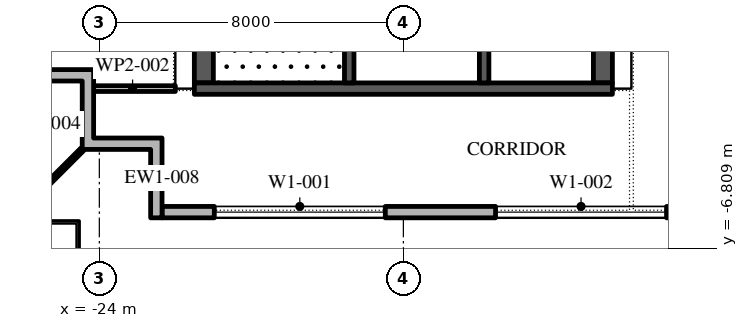
"""IFC4 building model, lengths in metres.
Left out: names, types, materials, properties, quantities, classifications, styles, units other than length and angle.
Written with IfcOpenShell. Run it as: python <this file> out.ifc"""

import sys

from ifc_helpers import new_model, si_unit, direction, frame, frame_2d, origin, place, context, subcontext, project, spatial, polyline, rectangle, outline, extrude, element, fill, save


model = new_model("IFC4")
c1 = context("Model", 3, precision=1e-05, world=origin(), true_north=direction((0.0, 1.0)))
c2 = subcontext(c1, "Body", "Model", "MODEL_VIEW")
j1 = project(units=[si_unit("LENGTHUNIT", "METRE"), si_unit("PLANEANGLEUNIT", "RADIAN")], contexts=[c1])
p1 = place(None, origin())
s1 = spatial("IfcSite", under=j1, at=p1, CompositionType="ELEMENT")
p2 = place(p1, origin())
s2 = spatial("IfcBuilding", under=s1, at=p2, CompositionType="ELEMENT")
p3 = place(p2, frame((0.0, 0.0, 342.6)))
s3 = spatial("IfcBuildingStorey", under=s2, at=p3, CompositionType="ELEMENT", Elevation=342.6)
p4 = place(p3, frame((-22.35, -5.85, 0.0), z_axis=(0.0, 0.0, 1.0), x_axis=(1.0, 0.0, 0.0)))
e1 = element("IfcWall", 1, at=p4, inside=s3, PredefinedType="STANDARD", context=c2, shape_type="SweptSolid", body=[
    extrude(rectangle(XDim=45.0, YDim=0.3, at=frame_2d((22.5, 0.0))), origin(), (0.0, 0.0, 1.0), 4.0),
])
p5 = place(p4, frame((1.375, 0.0, 0.45)))
e2 = element("IfcOpeningElement", 2, at=p5, cuts=e1, PredefinedType="OPENING", context=c2, shape_type="SweptSolid", body=[
    extrude(rectangle(XDim=4.5, YDim=3.05, at=frame_2d((2.25, 1.525))), frame((0.0, 0.16, 0.0), z_axis=(0.0, -1.0, 0.0), x_axis=(1.0, 0.0, 0.0)), (0.0, 0.0, 1.0), 0.32),
])
p6 = place(p4, frame((8.775, 0.0, 0.45)))
e3 = element("IfcOpeningElement", 3, at=p6, cuts=e1, PredefinedType="OPENING", context=c2, shape_type="SweptSolid", body=[
    extrude(rectangle(XDim=4.5, YDim=3.05, at=frame_2d((2.25, 1.525))), frame((0.0, 0.16, 0.0), z_axis=(0.0, -1.0, 0.0), x_axis=(1.0, 0.0, 0.0)), (0.0, 0.0, 1.0), 0.32),
])
p7 = place(p4, frame((17.375, 0.0, 0.0)))
e4 = element("IfcOpeningElement", 4, at=p7, cuts=e1, PredefinedType="OPENING", context=c2, shape_type="SweptSolid", body=[
    extrude(rectangle(XDim=2.4, YDim=3.5, at=frame_2d((1.2, 1.75))), frame((0.0, 0.16, 0.0), z_axis=(0.0, -1.0, 0.0), x_axis=(1.0, 0.0, 0.0)), (0.0, 0.0, 1.0), 0.32),
])
p8 = place(p4, frame((23.875, 0.0, 0.45)))
e5 = element("IfcOpeningElement", 5, at=p8, cuts=e1, PredefinedType="OPENING", context=c2, shape_type="SweptSolid", body=[
    extrude(rectangle(XDim=4.5, YDim=3.05, at=frame_2d((2.25, 1.525))), frame((0.0, 0.16, 0.0), z_axis=(0.0, -1.0, 0.0), x_axis=(1.0, 0.0, 0.0)), (0.0, 0.0, 1.0), 0.32),
])
p9 = place(p4, frame((31.425, 0.0, 0.45)))
e6 = element("IfcOpeningElement", 6, at=p9, cuts=e1, PredefinedType="OPENING", context=c2, shape_type="SweptSolid", body=[
    extrude(rectangle(XDim=4.5, YDim=3.05, at=frame_2d((2.25, 1.525))), frame((0.0, 0.16, 0.0), z_axis=(0.0, -1.0, 0.0), x_axis=(1.0, 0.0, 0.0)), (0.0, 0.0, 1.0), 0.32),
])
p10 = place(p4, frame((38.975, 0.0, 0.45)))
e7 = element("IfcOpeningElement", 7, at=p10, cuts=e1, PredefinedType="OPENING", context=c2, shape_type="SweptSolid", body=[
    extrude(rectangle(XDim=4.5, YDim=3.05, at=frame_2d((2.25, 1.525))), frame((0.0, 0.16, 0.0), z_axis=(0.0, -1.0, 0.0), x_axis=(1.0, 0.0, 0.0)), (0.0, 0.0, 1.0), 0.32),
])
p11 = place(p3, origin())
e8 = element("IfcWall", 8, at=p11, inside=s3, PredefinedType="STANDARD", context=c2, shape_type="SweptSolid", body=[
    extrude(outline(polyline([(-22.65, -4.2), (-24.45, -4.2), (-24.45, -2.4), (-25.95, -2.4), (-25.95, -2.1), (-24.15, -2.1), (-24.15, -3.9), (-22.35, -3.9), (-22.35, -6.0), (-22.65, -6.0), (-22.65, -4.2)])), origin(), (0.0, 0.0, 1.0), 4.0),
])
p12 = place(p3, frame((-24.45, -4.2, -0.05), z_axis=(0.0, 0.0, 1.0), x_axis=(-0.707106781187, -0.707106781187, 0.0)))
e9 = element("IfcWall", 9, at=p12, inside=s3, PredefinedType="STANDARD", context=c2, shape_type="SweptSolid", body=[
    extrude(rectangle(XDim=2.667, YDim=0.1, at=frame_2d((1.333, 0.0))), origin(), (0.0, 0.0, 1.0), 4.05),
])
p13 = place(p3, frame((-21.25, -2.45, 0.0), z_axis=(0.0, 0.0, 1.0), x_axis=(0.0, 1.0, 0.0)))
e10 = element("IfcWall", 10, at=p13, inside=s3, PredefinedType="SHEAR", context=c2, shape_type="SweptSolid", body=[
    extrude(rectangle(XDim=27.9, YDim=0.5, at=frame_2d((13.95, 0.0))), origin(), (0.0, 0.0, 1.0), 4.0),
])
p14 = place(p13, frame((5.05, 0.0, 0.0)))
e11 = element("IfcOpeningElement", 11, at=p14, cuts=e10, PredefinedType="OPENING", context=c2, shape_type="SweptSolid", body=[
    extrude(rectangle(XDim=1.2, YDim=2.1, at=frame_2d((0.6, 1.05))), frame((0.0, 0.26, 0.0), z_axis=(0.0, -1.0, 0.0), x_axis=(1.0, 0.0, 0.0)), (0.0, 0.0, 1.0), 0.52),
])
p15 = place(p13, frame((21.65, 0.0, 0.0)))
e12 = element("IfcOpeningElement", 12, at=p15, cuts=e10, PredefinedType="OPENING", context=c2, shape_type="SweptSolid", body=[
    extrude(rectangle(XDim=1.2, YDim=2.1, at=frame_2d((0.6, 1.05))), frame((0.0, 0.26, 0.0), z_axis=(0.0, -1.0, 0.0), x_axis=(1.0, 0.0, 0.0)), (0.0, 0.0, 1.0), 0.52),
])
p16 = place(p3, frame((-10.75, -2.45, 0.0), z_axis=(0.0, 0.0, 1.0), x_axis=(0.0, 1.0, 0.0)))
e13 = element("IfcWall", 13, at=p16, inside=s3, PredefinedType="SHEAR", context=c2, shape_type="SweptSolid", body=[
    extrude(rectangle(XDim=27.9, YDim=0.5, at=frame_2d((13.95, 0.0))), origin(), (0.0, 0.0, 1.0), 4.0),
])
p17 = place(p16, frame((23.65, 0.0, 0.0)))
e14 = element("IfcOpeningElement", 14, at=p17, cuts=e13, PredefinedType="OPENING", context=c2, shape_type="SweptSolid", body=[
    extrude(rectangle(XDim=2.4, YDim=2.1, at=frame_2d((1.2, 1.05))), frame((0.0, 0.26, 0.0), z_axis=(0.0, -1.0, 0.0), x_axis=(1.0, 0.0, 0.0)), (0.0, 0.0, 1.0), 0.52),
])
p18 = place(p16, frame((1.087, 0.0, 0.0)))
e15 = element("IfcOpeningElement", 15, at=p18, cuts=e13, PredefinedType="OPENING", context=c2, shape_type="SweptSolid", body=[
    extrude(rectangle(XDim=0.9, YDim=2.1, at=frame_2d((0.45, 1.05))), frame((0.0, 0.26, 0.0), z_axis=(0.0, -1.0, 0.0), x_axis=(1.0, 0.0, 0.0)), (0.0, 0.0, 1.0), 0.52),
])
p19 = place(p16, frame((4.262, 0.0, 0.0)))
e16 = element("IfcOpeningElement", 16, at=p19, cuts=e13, PredefinedType="OPENING", context=c2, shape_type="SweptSolid", body=[
    extrude(rectangle(XDim=1.0, YDim=2.1, at=frame_2d((0.5, 1.05))), frame((0.0, 0.26, 0.0), z_axis=(0.0, -1.0, 0.0), x_axis=(1.0, 0.0, 0.0)), (0.0, 0.0, 1.0), 0.52),
])
p20 = place(p3, frame((-21.5, -2.6, 0.0), z_axis=(0.0, 0.0, 1.0), x_axis=(1.0, 0.0, 0.0)))
e17 = element("IfcWall", 17, at=p20, inside=s3, PredefinedType="SHEAR", context=c2, shape_type="SweptSolid", body=[
    extrude(rectangle(XDim=11.0, YDim=0.3, at=frame_2d((5.5, 0.0))), origin(), (0.0, 0.0, 1.0), 4.0),
])
p21 = place(p3, frame((-17.425, -2.45, 0.0), z_axis=(0.0, 0.0, 1.0), x_axis=(0.0, 1.0, 0.0)))
e18 = element("IfcWall", 18, at=p21, inside=s3, PredefinedType="SHEAR", context=c2, shape_type="SweptSolid", body=[
    extrude(rectangle(XDim=6.3, YDim=0.25, at=frame_2d((3.15, 0.0))), origin(), (0.0, 0.0, 1.0), 4.0),
])
p22 = place(p21, frame((5.05, 0.0, 0.0)))
e19 = element("IfcOpeningElement", 19, at=p22, cuts=e18, PredefinedType="OPENING", context=c2, shape_type="SweptSolid", body=[
    extrude(rectangle(XDim=1.2, YDim=2.1, at=frame_2d((0.6, 1.05))), frame((0.0, 0.135, 0.0), z_axis=(0.0, -1.0, 0.0), x_axis=(1.0, 0.0, 0.0)), (0.0, 0.0, 1.0), 0.27),
])
p23 = place(p3, frame((-13.875, -2.45, 0.0), z_axis=(0.0, 0.0, 1.0), x_axis=(0.0, 1.0, 0.0)))
e20 = element("IfcWall", 20, at=p23, inside=s3, PredefinedType="SHEAR", context=c2, shape_type="SweptSolid", body=[
    extrude(rectangle(XDim=21.3, YDim=0.25, at=frame_2d((10.65, 0.0))), origin(), (0.0, 0.0, 1.0), 4.0),
])
p24 = place(p23, frame((11.357, 0.0, 0.0)))
e21 = element("IfcOpeningElement", 21, at=p24, cuts=e20, PredefinedType="OPENING", context=c2, shape_type="SweptSolid", body=[
    extrude(rectangle(XDim=0.9, YDim=2.1, at=frame_2d((0.45, 1.05))), frame((0.0, 0.135, 0.0), z_axis=(0.0, -1.0, 0.0), x_axis=(1.0, 0.0, 0.0)), (0.0, 0.0, 1.0), 0.27),
])
p25 = place(p23, frame((6.971, 0.0, 0.0)))
e22 = element("IfcOpeningElement", 22, at=p25, cuts=e20, PredefinedType="OPENING", context=c2, shape_type="SweptSolid", body=[
    extrude(rectangle(XDim=1.1, YDim=2.1, at=frame_2d((0.55, 1.05))), frame((0.0, 0.135, 0.0), z_axis=(0.0, -1.0, 0.0), x_axis=(1.0, 0.0, 0.0)), (0.0, 0.0, 1.0), 0.27),
])
p26 = place(p23, frame((15.543, 0.0, 0.0)))
e23 = element("IfcOpeningElement", 23, at=p26, cuts=e20, PredefinedType="OPENING", context=c2, shape_type="SweptSolid", body=[
    extrude(rectangle(XDim=1.1, YDim=2.1, at=frame_2d((0.55, 1.05))), frame((0.0, 0.135, 0.0), z_axis=(0.0, -1.0, 0.0), x_axis=(1.0, 0.0, 0.0)), (0.0, 0.0, 1.0), 0.27),
])
p27 = place(p23, frame((17.686, 0.0, 0.0)))
e24 = element("IfcOpeningElement", 24, at=p27, cuts=e20, PredefinedType="OPENING", context=c2, shape_type="SweptSolid", body=[
    extrude(rectangle(XDim=1.1, YDim=2.1, at=frame_2d((0.55, 1.05))), frame((0.0, 0.135, 0.0), z_axis=(0.0, -1.0, 0.0), x_axis=(1.0, 0.0, 0.0)), (0.0, 0.0, 1.0), 0.27),
])
p28 = place(p23, frame((19.829, 0.0, 0.0)))
e25 = element("IfcOpeningElement", 25, at=p28, cuts=e20, PredefinedType="OPENING", context=c2, shape_type="SweptSolid", body=[
    extrude(rectangle(XDim=1.1, YDim=2.1, at=frame_2d((0.55, 1.05))), frame((0.0, 0.135, 0.0), z_axis=(0.0, -1.0, 0.0), x_axis=(1.0, 0.0, 0.0)), (0.0, 0.0, 1.0), 0.27),
])
p29 = place(p3, frame((-24.25, -2.6, 0.0), z_axis=(0.0, 0.0, 1.0), x_axis=(1.0, 0.0, 0.0)))
e26 = element("IfcWall", 26, at=p29, inside=s3, PredefinedType="PARTITIONING", context=c2, shape_type="SweptSolid", body=[
    extrude(rectangle(XDim=2.25, YDim=0.15, at=frame_2d((1.125, 0.0))), origin(), (0.0, 0.0, 1.0), 4.0),
])
p30 = place(p5, origin())
e27 = element("IfcWindow", 27, at=p30, inside=s3, PartitioningType="DOUBLE_PANEL_VERTICAL", PredefinedType="WINDOW", context=c2, shape_type="SweptSolid", body=[
    extrude(rectangle(XDim=4.5, YDim=3.05, at=frame_2d((2.25, 1.525))), frame((0.0, 0.03, 0.0), z_axis=(0.0, -1.0, 0.0), x_axis=(1.0, 0.0, 0.0)), (0.0, 0.0, 1.0), 0.06),
])
fill(e2, e27)
p31 = place(p6, origin())
e28 = element("IfcWindow", 28, at=p31, inside=s3, PartitioningType="DOUBLE_PANEL_VERTICAL", PredefinedType="WINDOW", context=c2, shape_type="SweptSolid", body=[
    extrude(rectangle(XDim=4.5, YDim=3.05, at=frame_2d((2.25, 1.525))), frame((0.0, 0.03, 0.0), z_axis=(0.0, -1.0, 0.0), x_axis=(1.0, 0.0, 0.0)), (0.0, 0.0, 1.0), 0.06),
])
fill(e3, e28)
save(model, sys.argv[1])
